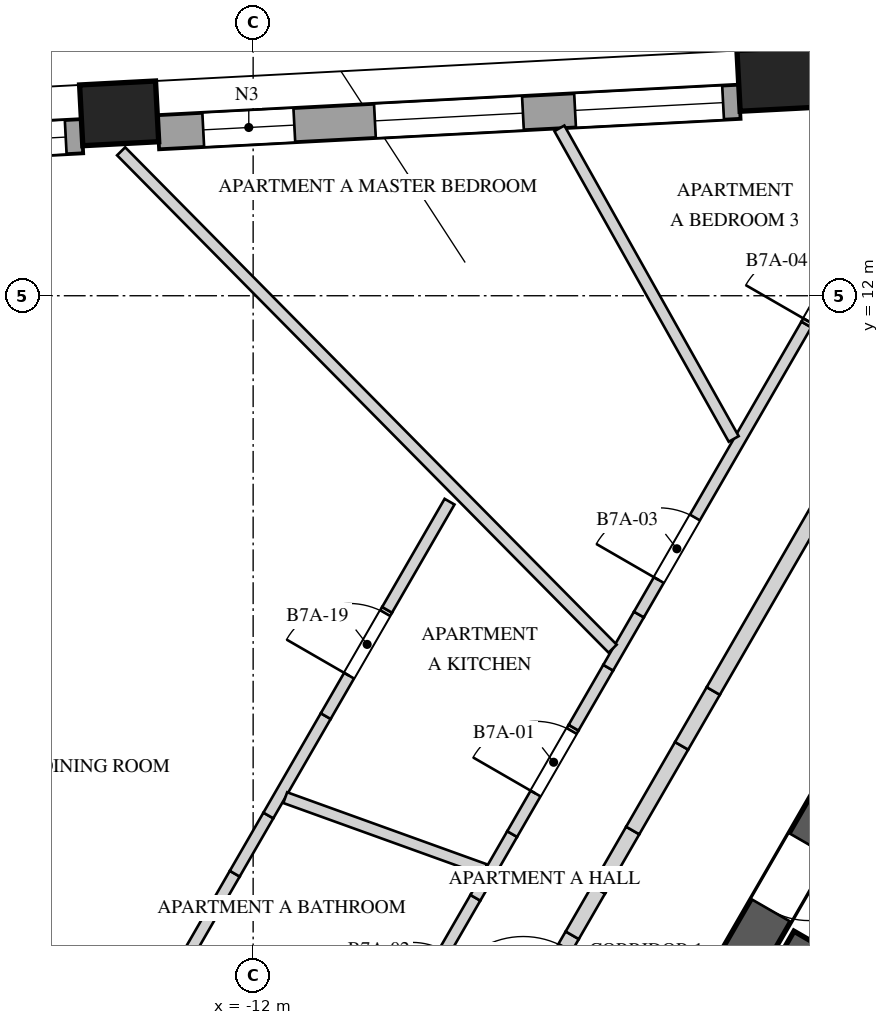
"""IFC4 building model, lengths in metres.
Left out: names, types, materials, properties, quantities, classifications, styles, units other than length and angle.
Written with IfcOpenShell. Run it as: python <this file> out.ifc"""

import sys

from ifc_helpers import new_model, si_unit, direction, frame, frame_2d, origin, origin_2d, place, context, subcontext, project, spatial, polyline, rectangle, outline, extrude, element, fill, save


model = new_model("IFC4")
c1 = context("Model", 3, precision=1e-05, world=origin(), true_north=direction((0.0, 1.0)))
c2 = subcontext(c1, "Body", "Model", "MODEL_VIEW")
j1 = project(units=[si_unit("LENGTHUNIT", "METRE"), si_unit("PLANEANGLEUNIT", "RADIAN")], contexts=[c1])
p1 = place(None, origin())
s1 = spatial("IfcSite", under=j1, at=p1, CompositionType="ELEMENT")
p2 = place(p1, origin())
s2 = spatial("IfcBuilding", under=s1, at=p2, CompositionType="ELEMENT")
p3 = place(p2, frame((0.0, 0.0, 274.4)))
s3 = spatial("IfcBuildingStorey", under=s2, at=p3, CompositionType="ELEMENT", Elevation=274.4)
p4 = place(p3, frame((-1.27, 10.7, 0.0), z_axis=(0.0, 0.0, 1.0), x_axis=(-0.499999536116, -0.866025671608, 0.0)))
e1 = element("IfcWall", 1, at=p4, inside=s3, PredefinedType="SHEAR", context=c2, shape_type="SweptSolid", body=[
    extrude(rectangle(XDim=17.263, YDim=0.6, at=frame_2d((8.631, 0.0))), origin(), (0.0, 0.0, 1.0), 4.0),
])
p5 = place(p4, frame((6.836, 0.0, 0.0)))
e2 = element("IfcOpeningElement", 2, at=p5, cuts=e1, PredefinedType="OPENING", context=c2, shape_type="SweptSolid", body=[
    extrude(rectangle(XDim=1.0, YDim=2.4, at=frame_2d((0.5, 1.2))), frame((0.0, 0.31, 0.0), z_axis=(0.0, -1.0, 0.0), x_axis=(1.0, 0.0, 0.0)), (0.0, 0.0, 1.0), 0.62),
])
p6 = place(p4, frame((15.034, 0.0, 0.0)))
e3 = element("IfcOpeningElement", 3, at=p6, cuts=e1, PredefinedType="OPENING", context=c2, shape_type="SweptSolid", body=[
    extrude(rectangle(XDim=0.8, YDim=2.1, at=frame_2d((0.4, 1.05))), frame((0.0, 0.31, 0.0), z_axis=(0.0, -1.0, 0.0), x_axis=(1.0, 0.0, 0.0)), (0.0, 0.0, 1.0), 0.62),
])
for number, where, z_axis, x_axis in (
    (4, (-5.115, 14.853, -0.35), (0.0, 0.0, 1.0), (-0.999, -0.052, 0.0)),
    (5, (-13.763, 14.399, -0.35), (0.0, 0.0, 1.0), (-0.999, -0.052, 0.0)),
):
    element("IfcColumn", number, at=place(p3, frame(where, z_axis=z_axis, x_axis=x_axis)), inside=s3, PredefinedType="COLUMN", context=c2, shape_type="SweptSolid", body=[
        extrude(rectangle(XDim=1.0, YDim=0.8, at=origin_2d()), origin(), (0.0, 0.0, 1.0), 4.35),
    ])
p7 = place(p3, frame((-5.599, 14.552, 0.0), z_axis=(0.0, 0.0, 1.0), x_axis=(-0.998628023429, -0.052364786088, 0.0)))
e6 = element("IfcWall", 6, at=p7, inside=s3, PredefinedType="SOLIDWALL", context=c2, shape_type="SweptSolid", body=[
    extrude(rectangle(XDim=7.66, YDim=0.45, at=frame_2d((3.83, 0.0))), origin(), (0.0, 0.0, 1.0), 3.3),
])
p8 = place(p7, frame((0.218, 0.0, 0.4)))
e7 = element("IfcOpeningElement", 7, at=p8, cuts=e6, PredefinedType="OPENING", context=c2, shape_type="SweptSolid", body=[
    extrude(rectangle(XDim=1.95, YDim=2.75, at=frame_2d((0.975, 1.375))), frame((0.0, 0.235, 0.0), z_axis=(0.0, -1.0, 0.0), x_axis=(1.0, 0.0, 0.0)), (0.0, 0.0, 1.0), 0.47),
])
p9 = place(p7, frame((2.855, 0.0, 0.4)))
e8 = element("IfcOpeningElement", 8, at=p9, cuts=e6, PredefinedType="OPENING", context=c2, shape_type="SweptSolid", body=[
    extrude(rectangle(XDim=1.95, YDim=2.75, at=frame_2d((0.975, 1.375))), frame((0.0, 0.235, 0.0), z_axis=(0.0, -1.0, 0.0), x_axis=(1.0, 0.0, 0.0)), (0.0, 0.0, 1.0), 0.47),
])
p10 = place(p7, frame((5.867, 0.0, 0.4)))
e9 = element("IfcOpeningElement", 9, at=p10, cuts=e6, PredefinedType="OPENING", context=c2, shape_type="SweptSolid", body=[
    extrude(rectangle(XDim=1.2, YDim=2.75, at=frame_2d((0.6, 1.375))), frame((0.0, 0.235, 0.0), z_axis=(0.0, -1.0, 0.0), x_axis=(1.0, 0.0, 0.0)), (0.0, 0.0, 1.0), 0.47),
])
p11 = place(p3, frame((-14.248, 14.099, 0.0), z_axis=(0.0, 0.0, 1.0), x_axis=(-0.998627701279, -0.052370929331, 0.0)))
e10 = element("IfcWall", 10, at=p11, inside=s3, PredefinedType="SOLIDWALL", context=c2, shape_type="SweptSolid", body=[
    extrude(rectangle(XDim=2.387, YDim=0.45, at=frame_2d((1.193, 0.0))), origin(), (0.0, 0.0, 1.0), 3.3),
])
p12 = place(p11, frame((0.218, 0.0, 0.4)))
e11 = element("IfcOpeningElement", 11, at=p12, cuts=e10, PredefinedType="OPENING", context=c2, shape_type="SweptSolid", body=[
    extrude(rectangle(XDim=1.95, YDim=2.75, at=frame_2d((0.975, 1.375))), frame((0.0, 0.235, 0.0), z_axis=(0.0, -1.0, 0.0), x_axis=(1.0, 0.0, 0.0)), (0.0, 0.0, 1.0), 0.47),
])
p13 = place(p3, frame((-4.581, 3.465, 0.0), z_axis=(0.0, 0.0, 1.0), x_axis=(-0.499996545922, -0.866027397988, 0.0)))
e12 = element("IfcWall", 12, at=p13, inside=s3, PredefinedType="SOLIDWALL", context=c2, shape_type="SweptSolid", body=[
    extrude(rectangle(XDim=5.5, YDim=0.7, at=frame_2d((2.75, 0.0))), origin(), (0.0, 0.0, 1.0), 3.65),
])
p14 = place(p3, frame((-9.931, 2.599, 0.0), z_axis=(0.0, 0.0, 1.0), x_axis=(0.500056273262, 0.865992911964, 0.0)))
e13 = element("IfcWall", 13, at=p14, inside=s3, PredefinedType="PARTITIONING", context=c2, shape_type="SweptSolid", body=[
    extrude(outline(polyline([(0.0, 0.0), (1.709, 0.0), (1.709, 2.55), (0.825, 2.55), (0.825, 3.65), (0.0, 3.65), (0.0, 0.0)])), frame((0.0, 0.075, 0.0), z_axis=(0.0, -1.0, 0.0), x_axis=(1.0, 0.0, 0.0)), (0.0, 0.0, 1.0), 0.15),
])
p15 = place(p14, frame((0.05, 0.0, 0.0)))
e14 = element("IfcOpeningElement", 14, at=p15, cuts=e13, PredefinedType="OPENING", context=c2, shape_type="SweptSolid", body=[
    extrude(rectangle(XDim=0.85, YDim=2.4, at=frame_2d((0.425, 1.2))), frame((0.0, 0.085, 0.0), z_axis=(0.0, -1.0, 0.0), x_axis=(1.0, 0.0, 0.0)), (0.0, 0.0, 1.0), 0.17),
])
p16 = place(p3, frame((-9.076, 4.079, 0.0), z_axis=(0.0, 0.0, 1.0), x_axis=(0.499882561262, 0.866093196455, 0.0)))
e15 = element("IfcWall", 15, at=p16, inside=s3, PredefinedType="PARTITIONING", context=c2, shape_type="SweptSolid", body=[
    extrude(rectangle(XDim=0.968, YDim=0.15, at=frame_2d((0.484, 0.0))), origin(), (0.0, 0.0, 1.0), 3.65),
])
p17 = place(p3, frame((-8.592, 4.918, 0.0), z_axis=(0.0, 0.0, 1.0), x_axis=(0.500005767435, 0.866022073929, 0.0)))
e16 = element("IfcWall", 16, at=p17, inside=s3, PredefinedType="PARTITIONING", context=c2, shape_type="SweptSolid", body=[
    extrude(outline(polyline([(0.0, 0.0), (1.616, 0.0), (1.616, 3.65), (0.876, 3.65), (0.876, 2.55), (0.0, 2.55), (0.0, 0.0)])), frame((0.0, 0.075, 0.0), z_axis=(0.0, -1.0, 0.0), x_axis=(1.0, 0.0, 0.0)), (0.0, 0.0, 1.0), 0.15),
])
p18 = place(p17, frame((0.616, 0.0, 0.0)))
e17 = element("IfcOpeningElement", 17, at=p18, cuts=e16, PredefinedType="OPENING", context=c2, shape_type="SweptSolid", body=[
    extrude(rectangle(XDim=0.95, YDim=2.4, at=frame_2d((0.475, 1.2))), frame((0.0, 0.085, 0.0), z_axis=(0.0, -1.0, 0.0), x_axis=(1.0, 0.0, 0.0)), (0.0, 0.0, 1.0), 0.17),
])
p19 = place(p3, frame((-7.784, 6.317, 0.0), z_axis=(0.0, 0.0, 1.0), x_axis=(0.499884784933, 0.866091913016, 0.0)))
e18 = element("IfcWall", 18, at=p19, inside=s3, PredefinedType="PARTITIONING", context=c2, shape_type="SweptSolid", body=[
    extrude(rectangle(XDim=0.911, YDim=0.15, at=frame_2d((0.456, 0.0))), origin(), (0.0, 0.0, 1.0), 3.65),
])
p20 = place(p3, frame((-7.329, 7.107, 0.0), z_axis=(0.0, 0.0, 1.0), x_axis=(0.500106313205, 0.865964015126, 0.0)))
e19 = element("IfcWall", 19, at=p20, inside=s3, PredefinedType="PARTITIONING", context=c2, shape_type="SweptSolid", body=[
    extrude(rectangle(XDim=0.807, YDim=0.15, at=frame_2d((0.404, 0.0))), origin(), (0.0, 0.0, 1.0), 2.75),
])
p21 = place(p3, frame((-6.925, 7.806, 0.0), z_axis=(0.0, 0.0, 1.0), x_axis=(0.500024628788, 0.86601118388, 0.0)))
e20 = element("IfcWall", 20, at=p21, inside=s3, PredefinedType="PARTITIONING", context=c2, shape_type="SweptSolid", body=[
    extrude(rectangle(XDim=4.406, YDim=0.15, at=frame_2d((2.203, 0.0))), origin(), (0.0, 0.0, 1.0), 3.65),
])
p22 = place(p21, frame((0.524, 0.0, 0.0)))
e21 = element("IfcOpeningElement", 21, at=p22, cuts=e20, PredefinedType="OPENING", context=c2, shape_type="SweptSolid", body=[
    extrude(rectangle(XDim=0.95, YDim=2.4, at=frame_2d((0.475, 1.2))), frame((0.0, 0.085, 0.0), z_axis=(0.0, -1.0, 0.0), x_axis=(1.0, 0.0, 0.0)), (0.0, 0.0, 1.0), 0.17),
])
p23 = place(p3, frame((-4.722, 11.622, 0.0), z_axis=(0.0, 0.0, 1.0), x_axis=(0.499973075538, 0.866040948072, 0.0)))
e22 = element("IfcWall", 22, at=p23, inside=s3, PredefinedType="PARTITIONING", context=c2, shape_type="SweptSolid", body=[
    extrude(outline(polyline([(0.0, 0.0), (1.349, 0.0), (1.349, 2.95), (0.455, 2.95), (0.455, 3.65), (0.0, 3.65), (0.0, 0.0)])), frame((0.0, 0.075, 0.0), z_axis=(0.0, -1.0, 0.0), x_axis=(1.0, 0.0, 0.0)), (0.0, 0.0, 1.0), 0.15),
])
p24 = place(p23, frame((0.05, 0.0, 0.0)))
e23 = element("IfcOpeningElement", 23, at=p24, cuts=e22, PredefinedType="OPENING", context=c2, shape_type="SweptSolid", body=[
    extrude(rectangle(XDim=0.95, YDim=2.4, at=frame_2d((0.475, 1.2))), frame((0.0, 0.085, 0.0), z_axis=(0.0, -1.0, 0.0), x_axis=(1.0, 0.0, 0.0)), (0.0, 0.0, 1.0), 0.17),
])
p25 = place(p3, frame((-13.737, 13.9, 0.0), z_axis=(0.0, 0.0, 1.0), x_axis=(0.702901092217, -0.711287603266, 0.0)))
e24 = element("IfcWall", 24, at=p25, inside=s3, PredefinedType="PARTITIONING", context=c2, shape_type="SweptSolid", body=[
    extrude(rectangle(XDim=9.199, YDim=0.15, at=frame_2d((4.6, 0.0))), origin(), (0.0, 0.0, 1.0), 2.75),
])
p26 = place(p3, frame((-13.5, 2.218, 0.0), z_axis=(0.0, 0.0, 1.0), x_axis=(0.500010832295, 0.866019149666, 0.0)))
e25 = element("IfcWall", 25, at=p26, inside=s3, PredefinedType="PARTITIONING", context=c2, shape_type="SweptSolid", body=[
    extrude(rectangle(XDim=2.516, YDim=0.15, at=frame_2d((1.258, 0.0))), origin(), (0.0, 0.0, 1.0), 3.65),
])
p27 = place(p3, frame((-12.242, 4.396, 0.0), z_axis=(0.0, 0.0, 1.0), x_axis=(0.500088960417, 0.865974036371, 0.0)))
e26 = element("IfcWall", 26, at=p27, inside=s3, PredefinedType="PARTITIONING", context=c2, shape_type="SweptSolid", body=[
    extrude(rectangle(XDim=0.884, YDim=0.15, at=frame_2d((0.442, 0.0))), origin(), (0.0, 0.0, 1.0), 2.55),
])
p28 = place(p3, frame((-11.8, 5.162, 0.0), z_axis=(0.0, 0.0, 1.0), x_axis=(0.500035089595, 0.866005143849, 0.0)))
e27 = element("IfcWall", 27, at=p28, inside=s3, PredefinedType="PARTITIONING", context=c2, shape_type="SweptSolid", body=[
    extrude(rectangle(XDim=1.51, YDim=0.15, at=frame_2d((0.755, 0.0))), origin(), (0.0, 0.0, 1.0), 3.65),
])
p29 = place(p3, frame((-11.045, 6.469, 0.0), z_axis=(0.0, 0.0, 1.0), x_axis=(0.499944992379, 0.86605716012, 0.0)))
e28 = element("IfcWall", 28, at=p29, inside=s3, PredefinedType="PARTITIONING", context=c2, shape_type="SweptSolid", body=[
    extrude(outline(polyline([(0.0, 0.0), (1.615, 0.0), (1.615, 3.65), (0.876, 3.65), (0.876, 2.55), (0.0, 2.55), (0.0, 0.0)])), frame((0.0, 0.075, 0.0), z_axis=(0.0, -1.0, 0.0), x_axis=(1.0, 0.0, 0.0)), (0.0, 0.0, 1.0), 0.15),
])
p30 = place(p29, frame((0.615, 0.0, 0.0)))
e29 = element("IfcOpeningElement", 29, at=p30, cuts=e28, PredefinedType="OPENING", context=c2, shape_type="SweptSolid", body=[
    extrude(rectangle(XDim=0.95, YDim=2.4, at=frame_2d((0.475, 1.2))), frame((0.0, 0.085, 0.0), z_axis=(0.0, -1.0, 0.0), x_axis=(1.0, 0.0, 0.0)), (0.0, 0.0, 1.0), 0.17),
])
p31 = place(p3, frame((-10.238, 7.868, 0.0), z_axis=(0.0, 0.0, 1.0), x_axis=(0.500069669507, 0.865985176339, 0.0)))
e30 = element("IfcWall", 30, at=p31, inside=s3, PredefinedType="PARTITIONING", context=c2, shape_type="SweptSolid", body=[
    extrude(rectangle(XDim=1.643, YDim=0.15, at=frame_2d((0.822, 0.0))), origin(), (0.0, 0.0, 1.0), 3.65),
])
p32 = place(p3, frame((-8.949, 4.449, 0.0), z_axis=(0.0, 0.0, 1.0), x_axis=(-0.940703467008, 0.33922999154, 0.0)))
e31 = element("IfcWall", 31, at=p32, inside=s3, PredefinedType="PARTITIONING", context=c2, shape_type="SweptSolid", body=[
    extrude(rectangle(XDim=2.794, YDim=0.15, at=frame_2d((1.397, 0.0))), origin(), (0.0, 0.0, 1.0), 3.65),
])
p33 = place(p3, frame((-7.971, 14.202, 0.0), z_axis=(0.0, 0.0, 1.0), x_axis=(0.489424944671, -0.872045425155, 0.0)))
e32 = element("IfcWall", 32, at=p33, inside=s3, PredefinedType="PARTITIONING", context=c2, shape_type="SweptSolid", body=[
    extrude(rectangle(XDim=4.686, YDim=0.15, at=frame_2d((2.343, 0.0))), origin(), (0.0, 0.0, 1.0), 3.65),
])
p34 = place(p3, frame((-8.472, 2.427, 0.0), z_axis=(0.0, 0.0, 1.0), x_axis=(0.500022371132, 0.86601248742, 0.0)))
e33 = element("IfcWall", 33, at=p34, inside=s3, PredefinedType="SOLIDWALL", context=c2, shape_type="SweptSolid", body=[
    extrude(outline(polyline([(0.0, 0.0), (1.339, 0.0), (1.339, 2.55), (0.429, 2.55), (0.429, 3.65), (0.0, 3.65), (0.0, 0.0)])), frame((0.0, 0.1, 0.0), z_axis=(0.0, -1.0, 0.0), x_axis=(1.0, 0.0, 0.0)), (0.0, 0.0, 1.0), 0.2),
])
p35 = place(p34, frame((0.05, 0.0, 0.0)))
e34 = element("IfcOpeningElement", 34, at=p35, cuts=e33, PredefinedType="OPENING", context=c2, shape_type="SweptSolid", body=[
    extrude(rectangle(XDim=1.1, YDim=2.4, at=frame_2d((0.55, 1.2))), frame((0.0, 0.11, 0.0), z_axis=(0.0, -1.0, 0.0), x_axis=(1.0, 0.0, 0.0)), (0.0, 0.0, 1.0), 0.22),
])
p36 = place(p3, frame((-7.802, 3.586, 0.0), z_axis=(0.0, 0.0, 1.0), x_axis=(0.500242282693, 0.865885476611, 0.0)))
e35 = element("IfcWall", 35, at=p36, inside=s3, PredefinedType="SOLIDWALL", context=c2, shape_type="SweptSolid", body=[
    extrude(rectangle(XDim=0.691, YDim=0.2, at=frame_2d((0.346, 0.0))), origin(), (0.0, 0.0, 1.0), 3.65),
])
p37 = place(p3, frame((-7.457, 4.185, 0.0), z_axis=(0.0, 0.0, 1.0), x_axis=(0.499753735824, 0.866167537795, 0.0)))
e36 = element("IfcWall", 36, at=p37, inside=s3, PredefinedType="SOLIDWALL", context=c2, shape_type="SweptSolid", body=[
    extrude(rectangle(XDim=0.901, YDim=0.2, at=frame_2d((0.45, 0.0))), origin(), (0.0, 0.0, 1.0), 2.55),
])
p38 = place(p3, frame((-7.006, 4.965, 0.0), z_axis=(0.0, 0.0, 1.0), x_axis=(0.500018234033, 0.866014876105, 0.0)))
e37 = element("IfcWall", 37, at=p38, inside=s3, PredefinedType="SOLIDWALL", context=c2, shape_type="SweptSolid", body=[
    extrude(rectangle(XDim=1.286, YDim=0.2, at=frame_2d((0.643, 0.0))), origin(), (0.0, 0.0, 1.0), 3.65),
])
p39 = place(p3, frame((-6.363, 6.079, 0.0), z_axis=(0.0, 0.0, 1.0), x_axis=(0.499950631041, 0.86605390509, 0.0)))
e38 = element("IfcWall", 38, at=p39, inside=s3, PredefinedType="SOLIDWALL", context=c2, shape_type="SweptSolid", body=[
    extrude(rectangle(XDim=0.833, YDim=0.2, at=frame_2d((0.417, 0.0))), origin(), (0.0, 0.0, 1.0), 2.75),
])
p40 = place(p3, frame((-5.947, 6.801, 0.0), z_axis=(0.0, 0.0, 1.0), x_axis=(0.500007556608, 0.866021040931, 0.0)))
e39 = element("IfcWall", 39, at=p40, inside=s3, PredefinedType="SOLIDWALL", context=c2, shape_type="SweptSolid", body=[
    extrude(rectangle(XDim=4.052, YDim=0.2, at=frame_2d((2.026, 0.0))), origin(), (0.0, 0.0, 1.0), 3.65),
])
p41 = place(p8, origin())
e40 = element("IfcWindow", 40, at=p41, inside=s3, PartitioningType="SINGLE_PANEL", PredefinedType="WINDOW", context=c2, shape_type="SweptSolid", body=[
    extrude(rectangle(XDim=1.95, YDim=2.75, at=frame_2d((0.975, 1.375))), frame((0.0, 0.03, 0.0), z_axis=(0.0, -1.0, 0.0), x_axis=(1.0, 0.0, 0.0)), (0.0, 0.0, 1.0), 0.06),
])
fill(e7, e40)
p42 = place(p9, origin())
e41 = element("IfcWindow", 41, at=p42, inside=s3, PartitioningType="SINGLE_PANEL", PredefinedType="WINDOW", context=c2, shape_type="SweptSolid", body=[
    extrude(rectangle(XDim=1.95, YDim=2.75, at=frame_2d((0.975, 1.375))), frame((0.0, 0.03, 0.0), z_axis=(0.0, -1.0, 0.0), x_axis=(1.0, 0.0, 0.0)), (0.0, 0.0, 1.0), 0.06),
])
fill(e8, e41)
p43 = place(p10, origin())
e42 = element("IfcWindow", 42, at=p43, inside=s3, PartitioningType="SINGLE_PANEL", PredefinedType="WINDOW", context=c2, shape_type="SweptSolid", body=[
    extrude(rectangle(XDim=1.2, YDim=2.75, at=frame_2d((0.6, 1.375))), frame((0.0, 0.03, 0.0), z_axis=(0.0, -1.0, 0.0), x_axis=(1.0, 0.0, 0.0)), (0.0, 0.0, 1.0), 0.06),
])
fill(e9, e42)
p44 = place(p12, origin())
e43 = element("IfcWindow", 43, at=p44, inside=s3, PartitioningType="SINGLE_PANEL", PredefinedType="WINDOW", context=c2, shape_type="SweptSolid", body=[
    extrude(rectangle(XDim=1.95, YDim=2.75, at=frame_2d((0.975, 1.375))), frame((0.0, 0.03, 0.0), z_axis=(0.0, -1.0, 0.0), x_axis=(1.0, 0.0, 0.0)), (0.0, 0.0, 1.0), 0.06),
])
fill(e11, e43)
p45 = place(p5, origin())
e44 = element("IfcDoor", 44, at=p45, inside=s3, OperationType="SINGLE_SWING_LEFT", PredefinedType="DOOR", context=c2, shape_type="SweptSolid", body=[
    extrude(rectangle(XDim=1.0, YDim=2.4, at=frame_2d((0.5, 1.2))), frame((0.0, 0.025, 0.0), z_axis=(0.0, -1.0, 0.0), x_axis=(1.0, 0.0, 0.0)), (0.0, 0.0, 1.0), 0.05),
])
fill(e2, e44)
p46 = place(p18, origin())
e45 = element("IfcDoor", 45, at=p46, inside=s3, OperationType="SINGLE_SWING_LEFT", PredefinedType="DOOR", context=c2, shape_type="SweptSolid", body=[
    extrude(rectangle(XDim=0.95, YDim=2.4, at=frame_2d((0.475, 1.2))), frame((0.0, 0.025, 0.0), z_axis=(0.0, -1.0, 0.0), x_axis=(1.0, 0.0, 0.0)), (0.0, 0.0, 1.0), 0.05),
])
fill(e17, e45)
p47 = place(p22, origin())
e46 = element("IfcDoor", 46, at=p47, inside=s3, OperationType="SINGLE_SWING_LEFT", PredefinedType="DOOR", context=c2, shape_type="SweptSolid", body=[
    extrude(rectangle(XDim=0.95, YDim=2.4, at=frame_2d((0.475, 1.2))), frame((0.0, 0.025, 0.0), z_axis=(0.0, -1.0, 0.0), x_axis=(1.0, 0.0, 0.0)), (0.0, 0.0, 1.0), 0.05),
])
fill(e21, e46)
p48 = place(p24, origin())
e47 = element("IfcDoor", 47, at=p48, inside=s3, OperationType="SINGLE_SWING_RIGHT", PredefinedType="DOOR", context=c2, shape_type="SweptSolid", body=[
    extrude(rectangle(XDim=0.95, YDim=2.4, at=frame_2d((0.475, 1.2))), frame((0.0, 0.025, 0.0), z_axis=(0.0, -1.0, 0.0), x_axis=(1.0, 0.0, 0.0)), (0.0, 0.0, 1.0), 0.05),
])
fill(e23, e47)
p49 = place(p30, origin())
e48 = element("IfcDoor", 48, at=p49, inside=s3, OperationType="SINGLE_SWING_LEFT", PredefinedType="DOOR", context=c2, shape_type="SweptSolid", body=[
    extrude(rectangle(XDim=0.95, YDim=2.4, at=frame_2d((0.475, 1.2))), frame((0.0, 0.025, 0.0), z_axis=(0.0, -1.0, 0.0), x_axis=(1.0, 0.0, 0.0)), (0.0, 0.0, 1.0), 0.05),
])
fill(e29, e48)
save(model, sys.argv[1])
